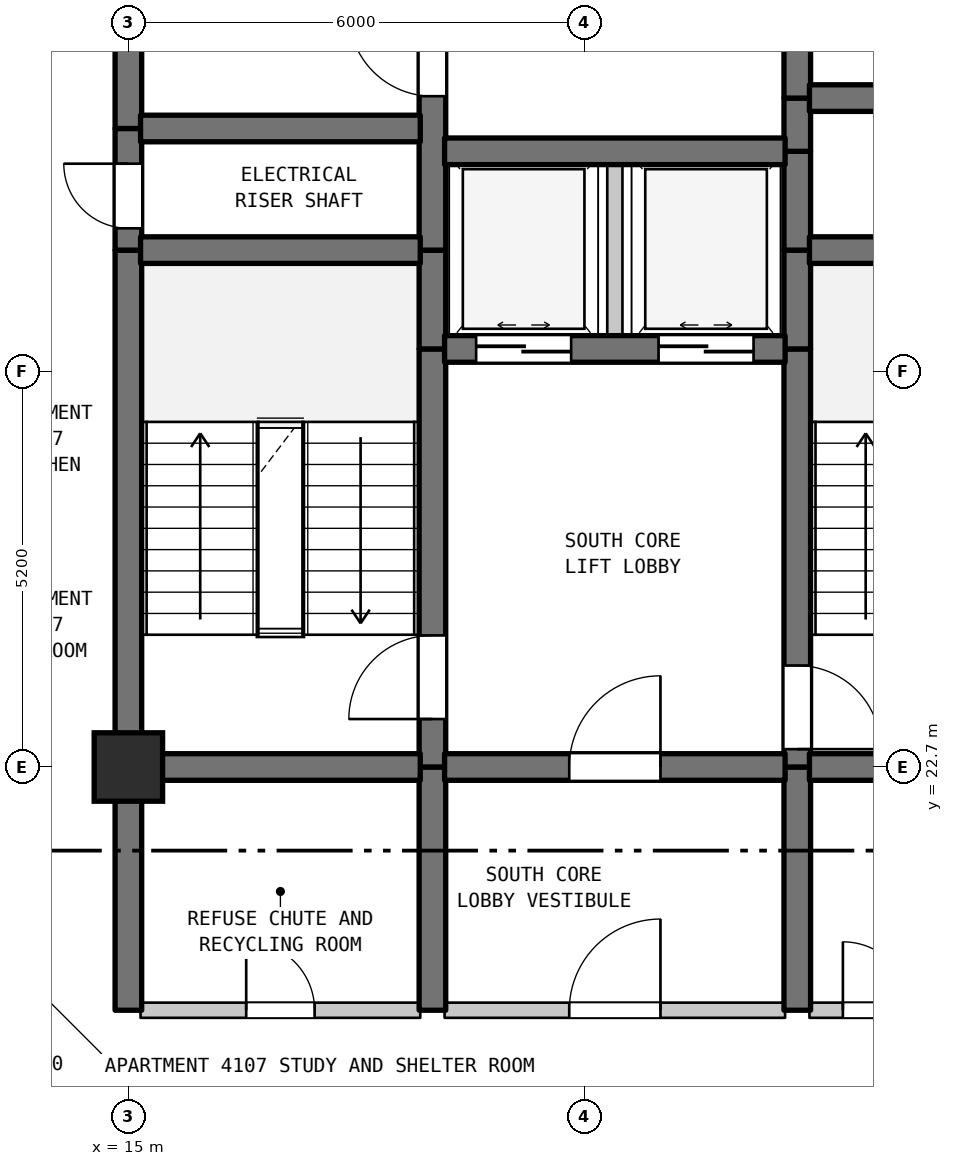
"""IFC4 building model, lengths in metres.
Left out: names, types, materials, properties, quantities, classifications, styles, units other than length and angle.
Written with IfcOpenShell. Run it as: python <this file> out.ifc"""

import sys

from ifc_helpers import new_model, si_unit, direction, frame, frame_2d, origin, origin_2d, place, context, subcontext, project, spatial, rectangle, extrude, element, fill, save


model = new_model("IFC4")
c1 = context("Model", 3, precision=1e-05, world=origin(), true_north=direction((0.0, 1.0)))
c2 = subcontext(c1, "Body", "Model", "MODEL_VIEW")
j1 = project(units=[si_unit("LENGTHUNIT", "METRE"), si_unit("PLANEANGLEUNIT", "RADIAN")], contexts=[c1])
p1 = place(None, origin())
s1 = spatial("IfcSite", under=j1, at=p1, CompositionType="ELEMENT")
p2 = place(p1, origin())
s2 = spatial("IfcBuilding", under=s1, at=p2, CompositionType="ELEMENT")
p3 = place(p2, frame((0.0, 0.0, 169.1)))
s3 = spatial("IfcBuildingStorey", under=s2, at=p3, CompositionType="ELEMENT", Elevation=169.1)
p4 = place(p3, frame((15.0, 22.7, 0.0), z_axis=(0.0, 0.0, 1.0), x_axis=(1.0, 0.0, 0.0)))
e1 = element("IfcColumn", 1, at=p4, inside=s3, PredefinedType="COLUMN", context=c2, shape_type="SweptSolid", body=[
    extrude(rectangle(XDim=0.9, YDim=0.9, at=origin_2d()), origin(), (0.0, 0.0, 1.0), 3.7),
])
p5 = place(p3, frame((15.0, 19.5, 0.0), z_axis=(0.0, 0.0, 1.0), x_axis=(0.0, 1.0, 0.0)))
e2 = element("IfcWall", 2, at=p5, inside=s3, PredefinedType="SHEAR", context=c2, shape_type="SweptSolid", body=[
    extrude(rectangle(XDim=3.2, YDim=0.35, at=frame_2d((1.6, 0.0))), origin(), (0.0, 0.0, 1.0), 3.39),
])
p6 = place(p3, frame((15.0, 22.7, 0.0), z_axis=(0.0, 0.0, 1.0), x_axis=(0.0, 1.0, 0.0)))
e3 = element("IfcWall", 3, at=p6, inside=s3, PredefinedType="SHEAR", context=c2, shape_type="SweptSolid", body=[
    extrude(rectangle(XDim=6.8, YDim=0.35, at=frame_2d((3.4, 0.0))), origin(), (0.0, 0.0, 1.0), 3.39),
])
p7 = place(p3, frame((15.0, 29.5, 0.0), z_axis=(0.0, 0.0, 1.0), x_axis=(0.0, 1.0, 0.0)))
e4 = element("IfcWall", 4, at=p7, inside=s3, PredefinedType="SHEAR", context=c2, shape_type="SweptSolid", body=[
    extrude(rectangle(XDim=1.6, YDim=0.35, at=frame_2d((0.8, 0.0))), origin(), (0.0, 0.0, 1.0), 3.39),
])
p8 = place(p7, frame((0.287, 0.0, 0.0)))
e5 = element("IfcOpeningElement", 5, at=p8, cuts=e4, PredefinedType="OPENING", context=c2, shape_type="SweptSolid", body=[
    extrude(rectangle(XDim=0.85, YDim=2.1, at=frame_2d((0.425, 1.05))), frame((0.0, 0.185, 0.0), z_axis=(0.0, -1.0, 0.0), x_axis=(1.0, 0.0, 0.0)), (0.0, 0.0, 1.0), 0.37),
])
p9 = place(p3, frame((15.0, 31.1, 0.0), z_axis=(0.0, 0.0, 1.0), x_axis=(0.0, 1.0, 0.0)))
e6 = element("IfcWall", 6, at=p9, inside=s3, PredefinedType="SHEAR", context=c2, shape_type="SweptSolid", body=[
    extrude(rectangle(XDim=6.8, YDim=0.35, at=frame_2d((3.4, 0.0))), origin(), (0.0, 0.0, 1.0), 3.39),
])
p10 = place(p3, frame((19.0, 19.5, 0.0), z_axis=(0.0, 0.0, 1.0), x_axis=(0.0, 1.0, 0.0)))
e7 = element("IfcWall", 7, at=p10, inside=s3, PredefinedType="SHEAR", context=c2, shape_type="SweptSolid", body=[
    extrude(rectangle(XDim=3.2, YDim=0.35, at=frame_2d((1.6, 0.0))), origin(), (0.0, 0.0, 1.0), 3.39),
])
p11 = place(p3, frame((19.0, 22.7, 0.0), z_axis=(0.0, 0.0, 1.0), x_axis=(0.0, 1.0, 0.0)))
e8 = element("IfcWall", 8, at=p11, inside=s3, PredefinedType="SHEAR", context=c2, shape_type="SweptSolid", body=[
    extrude(rectangle(XDim=5.5, YDim=0.35, at=frame_2d((2.75, 0.0))), origin(), (0.0, 0.0, 1.0), 3.39),
])
p12 = place(p11, frame((0.631, 0.0, 0.0)))
e9 = element("IfcOpeningElement", 9, at=p12, cuts=e8, PredefinedType="OPENING", context=c2, shape_type="SweptSolid", body=[
    extrude(rectangle(XDim=1.1, YDim=2.15, at=frame_2d((0.55, 1.075))), frame((0.0, 0.185, 0.0), z_axis=(0.0, -1.0, 0.0), x_axis=(1.0, 0.0, 0.0)), (0.0, 0.0, 1.0), 0.37),
])
p13 = place(p3, frame((19.0, 28.2, 0.0), z_axis=(0.0, 0.0, 1.0), x_axis=(0.0, 1.0, 0.0)))
e10 = element("IfcWall", 10, at=p13, inside=s3, PredefinedType="SHEAR", context=c2, shape_type="SweptSolid", body=[
    extrude(rectangle(XDim=1.3, YDim=0.35, at=frame_2d((0.65, 0.0))), origin(), (0.0, 0.0, 1.0), 3.39),
])
p14 = place(p3, frame((19.0, 29.5, 0.0), z_axis=(0.0, 0.0, 1.0), x_axis=(0.0, 1.0, 0.0)))
e11 = element("IfcWall", 11, at=p14, inside=s3, PredefinedType="SHEAR", context=c2, shape_type="SweptSolid", body=[
    extrude(rectangle(XDim=5.5, YDim=0.35, at=frame_2d((2.75, 0.0))), origin(), (0.0, 0.0, 1.0), 3.39),
])
p15 = place(p14, frame((2.025, 0.0, 0.0)))
e12 = element("IfcOpeningElement", 12, at=p15, cuts=e11, PredefinedType="OPENING", context=c2, shape_type="SweptSolid", body=[
    extrude(rectangle(XDim=1.1, YDim=2.15, at=frame_2d((0.55, 1.075))), frame((0.0, 0.185, 0.0), z_axis=(0.0, -1.0, 0.0), x_axis=(1.0, 0.0, 0.0)), (0.0, 0.0, 1.0), 0.37),
])
p16 = place(p3, frame((21.4, 28.2, 0.0), z_axis=(0.0, 0.0, 1.0), x_axis=(0.0, 1.0, 0.0)))
e13 = element("IfcWall", 13, at=p16, inside=s3, PredefinedType="STANDARD", context=c2, shape_type="SweptSolid", body=[
    extrude(rectangle(XDim=2.6, YDim=0.2, at=frame_2d((1.3, 0.0))), origin(), (0.0, 0.0, 1.0), 3.39),
])
p17 = place(p3, frame((23.8, 19.5, 0.0), z_axis=(0.0, 0.0, 1.0), x_axis=(0.0, 1.0, 0.0)))
e14 = element("IfcWall", 14, at=p17, inside=s3, PredefinedType="SHEAR", context=c2, shape_type="SweptSolid", body=[
    extrude(rectangle(XDim=3.2, YDim=0.35, at=frame_2d((1.6, 0.0))), origin(), (0.0, 0.0, 1.0), 3.39),
])
p18 = place(p3, frame((23.8, 22.7, 0.0), z_axis=(0.0, 0.0, 1.0), x_axis=(0.0, 1.0, 0.0)))
e15 = element("IfcWall", 15, at=p18, inside=s3, PredefinedType="SHEAR", context=c2, shape_type="SweptSolid", body=[
    extrude(rectangle(XDim=5.5, YDim=0.35, at=frame_2d((2.75, 0.0))), origin(), (0.0, 0.0, 1.0), 3.39),
])
p19 = place(p18, frame((0.235, 0.0, 0.0)))
e16 = element("IfcOpeningElement", 16, at=p19, cuts=e15, PredefinedType="OPENING", context=c2, shape_type="SweptSolid", body=[
    extrude(rectangle(XDim=1.1, YDim=2.15, at=frame_2d((0.55, 1.075))), frame((0.0, 0.185, 0.0), z_axis=(0.0, -1.0, 0.0), x_axis=(1.0, 0.0, 0.0)), (0.0, 0.0, 1.0), 0.37),
])
for number, where, z_axis, x_axis in (
    (17, (23.8, 28.2, 0.0), (0.0, 0.0, 1.0), (0.0, 1.0, 0.0)),
    (18, (23.8, 29.5, 0.0), (0.0, 0.0, 1.0), (0.0, 1.0, 0.0)),
):
    element("IfcWall", number, at=place(p3, frame(where, z_axis=z_axis, x_axis=x_axis)), inside=s3, PredefinedType="SHEAR", context=c2, shape_type="SweptSolid", body=[
        extrude(rectangle(XDim=1.3, YDim=0.35, at=frame_2d((0.65, 0.0))), origin(), (0.0, 0.0, 1.0), 3.39),
    ])
p20 = place(p3, frame((23.8, 30.8, 0.0), z_axis=(0.0, 0.0, 1.0), x_axis=(0.0, 1.0, 0.0)))
e19 = element("IfcWall", 19, at=p20, inside=s3, PredefinedType="SHEAR", context=c2, shape_type="SweptSolid", body=[
    extrude(rectangle(XDim=0.7, YDim=0.35, at=frame_2d((0.35, 0.0))), origin(), (0.0, 0.0, 1.0), 3.39),
])
p21 = place(p3, frame((23.8, 31.5, 0.0), z_axis=(0.0, 0.0, 1.0), x_axis=(0.0, 1.0, 0.0)))
e20 = element("IfcWall", 20, at=p21, inside=s3, PredefinedType="SHEAR", context=c2, shape_type="SweptSolid", body=[
    extrude(rectangle(XDim=3.5, YDim=0.35, at=frame_2d((1.75, 0.0))), origin(), (0.0, 0.0, 1.0), 3.39),
])
p22 = place(p21, frame((1.127, 0.0, 0.0)))
e21 = element("IfcOpeningElement", 21, at=p22, cuts=e20, PredefinedType="OPENING", context=c2, shape_type="SweptSolid", body=[
    extrude(rectangle(XDim=1.1, YDim=2.15, at=frame_2d((0.55, 1.075))), frame((0.0, 0.185, 0.0), z_axis=(0.0, -1.0, 0.0), x_axis=(1.0, 0.0, 0.0)), (0.0, 0.0, 1.0), 0.37),
])
p23 = place(p3, frame((15.16, 19.5, 0.0), z_axis=(0.0, 0.0, 1.0), x_axis=(1.0, 0.0, 0.0)))
e22 = element("IfcWall", 22, at=p23, inside=s3, PredefinedType="STANDARD", context=c2, shape_type="SweptSolid", body=[
    extrude(rectangle(XDim=3.68, YDim=0.2, at=frame_2d((1.84, 0.0))), origin(), (0.0, 0.0, 1.0), 3.39),
])
p24 = place(p23, frame((1.39, 0.0, 0.0)))
e23 = element("IfcOpeningElement", 23, at=p24, cuts=e22, PredefinedType="OPENING", context=c2, shape_type="SweptSolid", body=[
    extrude(rectangle(XDim=0.9, YDim=2.15, at=frame_2d((0.45, 1.075))), frame((0.0, 0.11, 0.0), z_axis=(0.0, -1.0, 0.0), x_axis=(1.0, 0.0, 0.0)), (0.0, 0.0, 1.0), 0.22),
])
p25 = place(p3, frame((19.16, 19.5, 0.0), z_axis=(0.0, 0.0, 1.0), x_axis=(1.0, 0.0, 0.0)))
e24 = element("IfcWall", 24, at=p25, inside=s3, PredefinedType="STANDARD", context=c2, shape_type="SweptSolid", body=[
    extrude(rectangle(XDim=4.48, YDim=0.2, at=frame_2d((2.24, 0.0))), origin(), (0.0, 0.0, 1.0), 3.39),
])
p26 = place(p25, frame((1.64, 0.0, 0.0)))
e25 = element("IfcOpeningElement", 25, at=p26, cuts=e24, PredefinedType="OPENING", context=c2, shape_type="SweptSolid", body=[
    extrude(rectangle(XDim=1.2, YDim=2.2, at=frame_2d((0.6, 1.1))), frame((0.0, 0.11, 0.0), z_axis=(0.0, -1.0, 0.0), x_axis=(1.0, 0.0, 0.0)), (0.0, 0.0, 1.0), 0.22),
])
p27 = place(p3, frame((23.96, 19.5, 0.0), z_axis=(0.0, 0.0, 1.0), x_axis=(1.0, 0.0, 0.0)))
e26 = element("IfcWall", 26, at=p27, inside=s3, PredefinedType="STANDARD", context=c2, shape_type="SweptSolid", body=[
    extrude(rectangle(XDim=1.855, YDim=0.2, at=frame_2d((0.927, 0.0))), origin(), (0.0, 0.0, 1.0), 3.39),
])
p28 = place(p27, frame((0.44, 0.0, 0.0)))
e27 = element("IfcOpeningElement", 27, at=p28, cuts=e26, PredefinedType="OPENING", context=c2, shape_type="SweptSolid", body=[
    extrude(rectangle(XDim=0.9, YDim=2.15, at=frame_2d((0.45, 1.075))), frame((0.0, 0.11, 0.0), z_axis=(0.0, -1.0, 0.0), x_axis=(1.0, 0.0, 0.0)), (0.0, 0.0, 1.0), 0.22),
])
p29 = place(p3, frame((15.16, 22.7, 0.0), z_axis=(0.0, 0.0, 1.0), x_axis=(1.0, 0.0, 0.0)))
e28 = element("IfcWall", 28, at=p29, inside=s3, PredefinedType="SHEAR", context=c2, shape_type="SweptSolid", body=[
    extrude(rectangle(XDim=3.68, YDim=0.35, at=frame_2d((1.84, 0.0))), origin(), (0.0, 0.0, 1.0), 3.39),
])
p30 = place(p3, frame((19.16, 22.7, 0.0), z_axis=(0.0, 0.0, 1.0), x_axis=(1.0, 0.0, 0.0)))
e29 = element("IfcWall", 29, at=p30, inside=s3, PredefinedType="SHEAR", context=c2, shape_type="SweptSolid", body=[
    extrude(rectangle(XDim=4.48, YDim=0.35, at=frame_2d((2.24, 0.0))), origin(), (0.0, 0.0, 1.0), 3.39),
])
p31 = place(p30, frame((1.64, 0.0, 0.0)))
e30 = element("IfcOpeningElement", 30, at=p31, cuts=e29, PredefinedType="OPENING", context=c2, shape_type="SweptSolid", body=[
    extrude(rectangle(XDim=1.2, YDim=2.2, at=frame_2d((0.6, 1.1))), frame((0.0, 0.185, 0.0), z_axis=(0.0, -1.0, 0.0), x_axis=(1.0, 0.0, 0.0)), (0.0, 0.0, 1.0), 0.37),
])
p32 = place(p3, frame((23.96, 22.7, 0.0), z_axis=(0.0, 0.0, 1.0), x_axis=(1.0, 0.0, 0.0)))
e31 = element("IfcWall", 31, at=p32, inside=s3, PredefinedType="SHEAR", context=c2, shape_type="SweptSolid", body=[
    extrude(rectangle(XDim=1.855, YDim=0.35, at=frame_2d((0.927, 0.0))), origin(), (0.0, 0.0, 1.0), 3.39),
])
p33 = place(p3, frame((19.16, 28.2, 0.0), z_axis=(0.0, 0.0, 1.0), x_axis=(1.0, 0.0, 0.0)))
e32 = element("IfcWall", 32, at=p33, inside=s3, PredefinedType="SHEAR", context=c2, shape_type="SweptSolid", body=[
    extrude(rectangle(XDim=4.48, YDim=0.35, at=frame_2d((2.24, 0.0))), origin(), (0.0, 0.0, 1.0), 3.39),
])
p34 = place(p33, frame((0.415, 0.0, 0.0)))
e33 = element("IfcOpeningElement", 33, at=p34, cuts=e32, PredefinedType="OPENING", context=c2, shape_type="SweptSolid", body=[
    extrude(rectangle(XDim=1.25, YDim=2.2, at=frame_2d((0.625, 1.1))), frame((0.0, 0.185, 0.0), z_axis=(0.0, -1.0, 0.0), x_axis=(1.0, 0.0, 0.0)), (0.0, 0.0, 1.0), 0.37),
])
p35 = place(p33, frame((2.815, 0.0, 0.0)))
e34 = element("IfcOpeningElement", 34, at=p35, cuts=e32, PredefinedType="OPENING", context=c2, shape_type="SweptSolid", body=[
    extrude(rectangle(XDim=1.25, YDim=2.2, at=frame_2d((0.625, 1.1))), frame((0.0, 0.185, 0.0), z_axis=(0.0, -1.0, 0.0), x_axis=(1.0, 0.0, 0.0)), (0.0, 0.0, 1.0), 0.37),
])
p36 = place(p3, frame((15.16, 29.5, 0.0), z_axis=(0.0, 0.0, 1.0), x_axis=(1.0, 0.0, 0.0)))
e35 = element("IfcWall", 35, at=p36, inside=s3, PredefinedType="SHEAR", context=c2, shape_type="SweptSolid", body=[
    extrude(rectangle(XDim=3.68, YDim=0.35, at=frame_2d((1.84, 0.0))), origin(), (0.0, 0.0, 1.0), 3.39),
])
p37 = place(p3, frame((23.96, 29.5, 0.0), z_axis=(0.0, 0.0, 1.0), x_axis=(1.0, 0.0, 0.0)))
e36 = element("IfcWall", 36, at=p37, inside=s3, PredefinedType="SHEAR", context=c2, shape_type="SweptSolid", body=[
    extrude(rectangle(XDim=3.18, YDim=0.35, at=frame_2d((1.59, 0.0))), origin(), (0.0, 0.0, 1.0), 3.39),
])
p38 = place(p3, frame((19.16, 30.8, 0.0), z_axis=(0.0, 0.0, 1.0), x_axis=(1.0, 0.0, 0.0)))
e37 = element("IfcWall", 37, at=p38, inside=s3, PredefinedType="SHEAR", context=c2, shape_type="SweptSolid", body=[
    extrude(rectangle(XDim=4.48, YDim=0.35, at=frame_2d((2.24, 0.0))), origin(), (0.0, 0.0, 1.0), 3.39),
])
p39 = place(p3, frame((15.16, 31.1, 0.0), z_axis=(0.0, 0.0, 1.0), x_axis=(1.0, 0.0, 0.0)))
e38 = element("IfcWall", 38, at=p39, inside=s3, PredefinedType="SHEAR", context=c2, shape_type="SweptSolid", body=[
    extrude(rectangle(XDim=3.68, YDim=0.35, at=frame_2d((1.84, 0.0))), origin(), (0.0, 0.0, 1.0), 3.39),
])
p40 = place(p3, frame((23.96, 31.5, 0.0), z_axis=(0.0, 0.0, 1.0), x_axis=(1.0, 0.0, 0.0)))
e39 = element("IfcWall", 39, at=p40, inside=s3, PredefinedType="SHEAR", context=c2, shape_type="SweptSolid", body=[
    extrude(rectangle(XDim=3.18, YDim=0.35, at=frame_2d((1.59, 0.0))), origin(), (0.0, 0.0, 1.0), 3.39),
])
p41 = place(p40, frame((1.094, 0.0, 0.0)))
e40 = element("IfcOpeningElement", 40, at=p41, cuts=e39, PredefinedType="OPENING", context=c2, shape_type="SweptSolid", body=[
    extrude(rectangle(XDim=0.85, YDim=2.1, at=frame_2d((0.425, 1.05))), frame((0.0, 0.185, 0.0), z_axis=(0.0, -1.0, 0.0), x_axis=(1.0, 0.0, 0.0)), (0.0, 0.0, 1.0), 0.37),
])
p42 = place(p8, origin())
e41 = element("IfcDoor", 41, at=p42, inside=s3, OperationType="SINGLE_SWING_RIGHT", PredefinedType="DOOR", context=c2, shape_type="SweptSolid", body=[
    extrude(rectangle(XDim=0.85, YDim=2.1, at=frame_2d((0.425, 1.05))), frame((0.0, 0.025, 0.0), z_axis=(0.0, -1.0, 0.0), x_axis=(1.0, 0.0, 0.0)), (0.0, 0.0, 1.0), 0.05),
])
fill(e5, e41)
p43 = place(p12, origin())
e42 = element("IfcDoor", 42, at=p43, inside=s3, OperationType="SINGLE_SWING_LEFT", PredefinedType="DOOR", context=c2, shape_type="SweptSolid", body=[
    extrude(rectangle(XDim=1.1, YDim=2.15, at=frame_2d((0.55, 1.075))), frame((0.0, 0.025, 0.0), z_axis=(0.0, -1.0, 0.0), x_axis=(1.0, 0.0, 0.0)), (0.0, 0.0, 1.0), 0.05),
])
fill(e9, e42)
p44 = place(p15, origin())
e43 = element("IfcDoor", 43, at=p44, inside=s3, OperationType="SINGLE_SWING_RIGHT", PredefinedType="DOOR", context=c2, shape_type="SweptSolid", body=[
    extrude(rectangle(XDim=1.1, YDim=2.15, at=frame_2d((0.55, 1.075))), frame((0.0, 0.025, 0.0), z_axis=(0.0, -1.0, 0.0), x_axis=(1.0, 0.0, 0.0)), (0.0, 0.0, 1.0), 0.05),
])
fill(e12, e43)
p45 = place(p19, frame((1.1, 0.0, 0.0), z_axis=(0.0, 0.0, 1.0), x_axis=(-1.0, 0.0, 0.0)))
e44 = element("IfcDoor", 44, at=p45, inside=s3, OperationType="SINGLE_SWING_LEFT", PredefinedType="DOOR", context=c2, shape_type="SweptSolid", body=[
    extrude(rectangle(XDim=1.1, YDim=2.15, at=frame_2d((0.55, 1.075))), frame((0.0, 0.025, 0.0), z_axis=(0.0, -1.0, 0.0), x_axis=(1.0, 0.0, 0.0)), (0.0, 0.0, 1.0), 0.05),
])
fill(e16, e44)
p46 = place(p24, origin())
e45 = element("IfcDoor", 45, at=p46, inside=s3, OperationType="SINGLE_SWING_LEFT", PredefinedType="DOOR", context=c2, shape_type="SweptSolid", body=[
    extrude(rectangle(XDim=0.9, YDim=2.15, at=frame_2d((0.45, 1.075))), frame((0.0, 0.025, 0.0), z_axis=(0.0, -1.0, 0.0), x_axis=(1.0, 0.0, 0.0)), (0.0, 0.0, 1.0), 0.05),
])
fill(e23, e45)
p47 = place(p26, origin())
e46 = element("IfcDoor", 46, at=p47, inside=s3, OperationType="SINGLE_SWING_RIGHT", PredefinedType="DOOR", context=c2, shape_type="SweptSolid", body=[
    extrude(rectangle(XDim=1.2, YDim=2.2, at=frame_2d((0.6, 1.1))), frame((0.0, 0.025, 0.0), z_axis=(0.0, -1.0, 0.0), x_axis=(1.0, 0.0, 0.0)), (0.0, 0.0, 1.0), 0.05),
])
fill(e25, e46)
p48 = place(p28, origin())
e47 = element("IfcDoor", 47, at=p48, inside=s3, OperationType="SINGLE_SWING_LEFT", PredefinedType="DOOR", context=c2, shape_type="SweptSolid", body=[
    extrude(rectangle(XDim=0.9, YDim=2.15, at=frame_2d((0.45, 1.075))), frame((0.0, 0.025, 0.0), z_axis=(0.0, -1.0, 0.0), x_axis=(1.0, 0.0, 0.0)), (0.0, 0.0, 1.0), 0.05),
])
fill(e27, e47)
p49 = place(p31, origin())
e48 = element("IfcDoor", 48, at=p49, inside=s3, OperationType="SINGLE_SWING_RIGHT", PredefinedType="DOOR", context=c2, shape_type="SweptSolid", body=[
    extrude(rectangle(XDim=1.2, YDim=2.2, at=frame_2d((0.6, 1.1))), frame((0.0, 0.025, 0.0), z_axis=(0.0, -1.0, 0.0), x_axis=(1.0, 0.0, 0.0)), (0.0, 0.0, 1.0), 0.05),
])
fill(e30, e48)
p50 = place(p34, origin())
e49 = element("IfcDoor", 49, at=p50, inside=s3, OperationType="DOUBLE_DOOR_SLIDING", PredefinedType="DOOR", context=c2, shape_type="SweptSolid", body=[
    extrude(rectangle(XDim=1.25, YDim=2.2, at=frame_2d((0.625, 1.1))), frame((0.0, 0.025, 0.0), z_axis=(0.0, -1.0, 0.0), x_axis=(1.0, 0.0, 0.0)), (0.0, 0.0, 1.0), 0.05),
])
fill(e33, e49)
p51 = place(p35, origin())
e50 = element("IfcDoor", 50, at=p51, inside=s3, OperationType="DOUBLE_DOOR_SLIDING", PredefinedType="DOOR", context=c2, shape_type="SweptSolid", body=[
    extrude(rectangle(XDim=1.25, YDim=2.2, at=frame_2d((0.625, 1.1))), frame((0.0, 0.025, 0.0), z_axis=(0.0, -1.0, 0.0), x_axis=(1.0, 0.0, 0.0)), (0.0, 0.0, 1.0), 0.05),
])
fill(e34, e50)
save(model, sys.argv[1])
